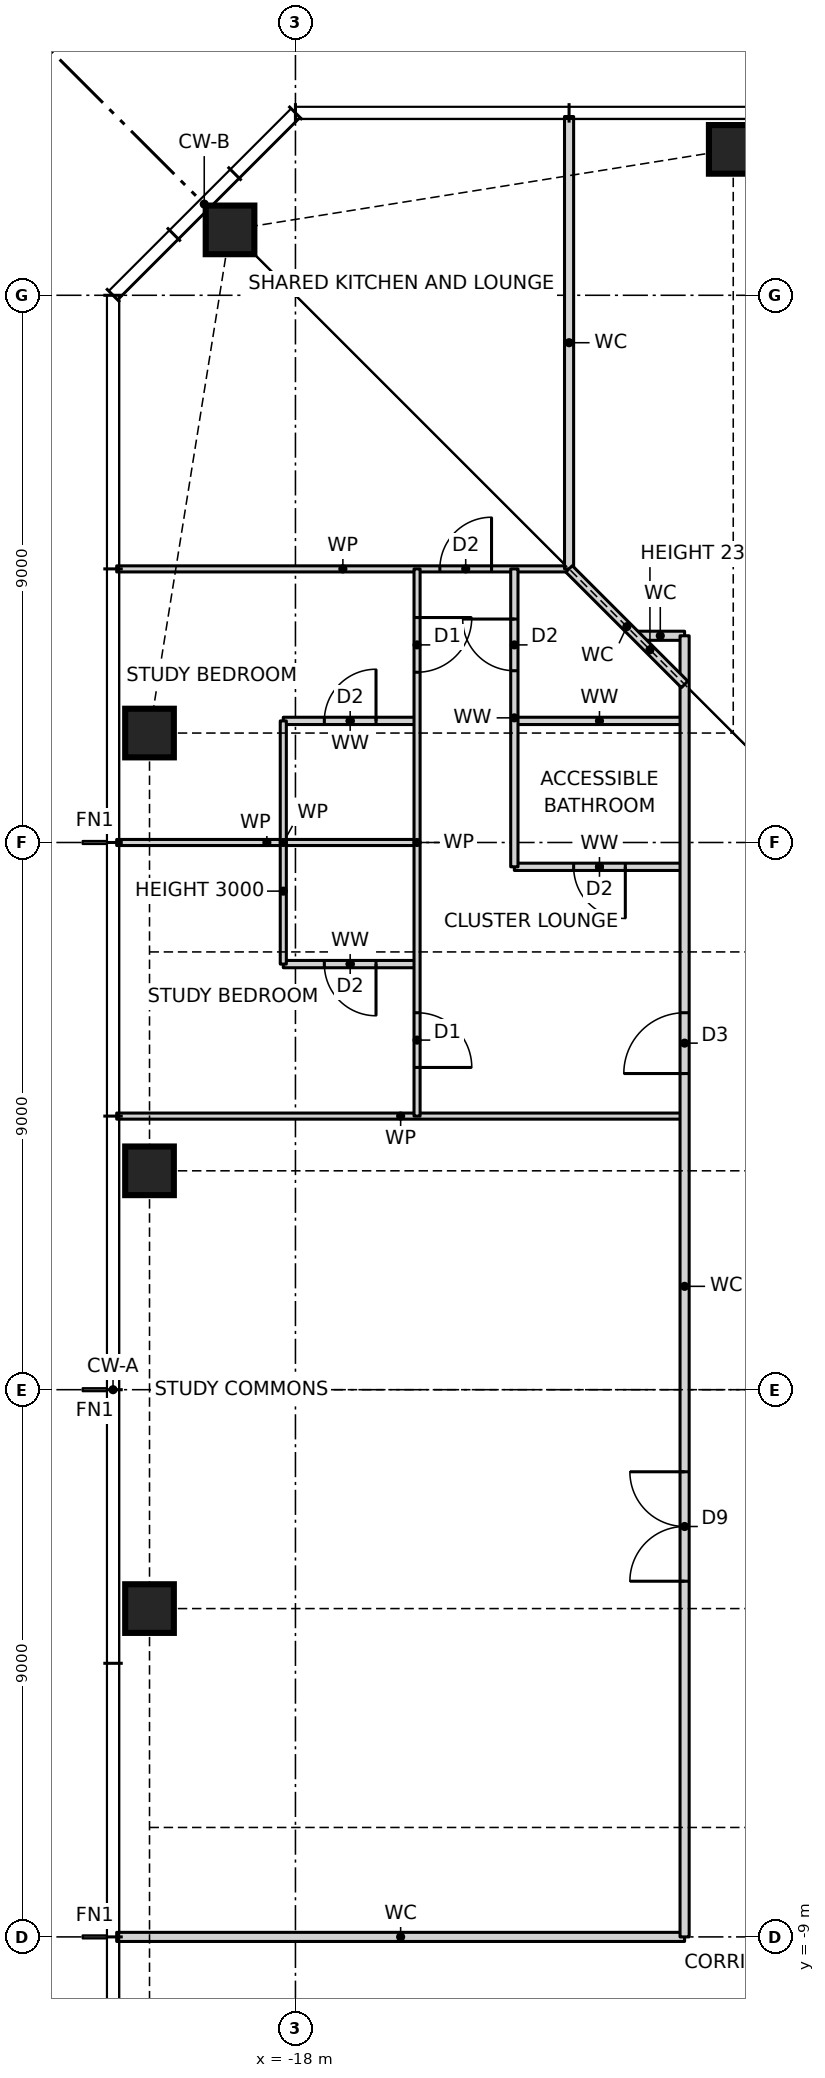
"""IFC4 building model, lengths in metres.
Left out: names, types, materials, properties, quantities, classifications, styles, units other than length and angle.
Written with IfcOpenShell. Run it as: python <this file> out.ifc"""

import sys

from ifc_helpers import new_model, si_unit, direction, frame, frame_2d, origin, origin_2d, place, context, subcontext, project, spatial, rectangle, hollow_rectangle, extrude, element, fill, save


model = new_model("IFC4")
c1 = context("Model", 3, precision=1e-05, world=origin(), true_north=direction((0.0, 1.0)))
c2 = subcontext(c1, "Body", "Model", "MODEL_VIEW")
j1 = project(units=[si_unit("LENGTHUNIT", "METRE"), si_unit("PLANEANGLEUNIT", "RADIAN")], contexts=[c1])
p1 = place(None, origin())
s1 = spatial("IfcSite", under=j1, at=p1, CompositionType="ELEMENT")
p2 = place(p1, origin())
s2 = spatial("IfcBuilding", under=s1, at=p2, CompositionType="ELEMENT")
p3 = place(p2, frame((0.0, 0.0, 115.5)))
s3 = spatial("IfcBuildingStorey", under=s2, at=p3, CompositionType="ELEMENT", Elevation=115.5)
for number, where, z_axis, x_axis in (
    (1, (-10.8, 20.4, 0.0), (0.0, 0.0, 1.0), (1.0, 0.0, 0.0)),
    (2, (-19.076, 19.076, 0.0), (0.0, 0.0, 1.0), (1.0, 0.0, 0.0)),
    (3, (-20.4, 10.8, 0.0), (0.0, 0.0, 1.0), (1.0, 0.0, 0.0)),
    (4, (-20.4, 3.6, 0.0), (0.0, 0.0, 1.0), (1.0, 0.0, 0.0)),
    (5, (-20.4, -3.6, 0.0), (0.0, 0.0, 1.0), (1.0, 0.0, 0.0)),
):
    element("IfcColumn", number, at=place(p3, frame(where, z_axis=z_axis, x_axis=x_axis)), inside=s3, PredefinedType="COLUMN", context=c2, shape_type="SweptSolid", body=[
        extrude(hollow_rectangle(XDim=0.8, YDim=0.8, WallThickness=0.07, at=origin_2d()), origin(), (0.0, 0.0, 1.0), 3.5),
    ])
p4 = place(p3, frame((-20.94, -9.0, 0.0), z_axis=(0.0, 0.0, 1.0), x_axis=(1.0, 0.0, 0.0)))
e6 = element("IfcWall", 6, at=p4, inside=s3, PredefinedType="PARTITIONING", context=c2, shape_type="SweptSolid", body=[
    extrude(rectangle(XDim=9.34, YDim=0.15, at=frame_2d((4.67, 0.0))), origin(), (0.0, 0.0, 1.0), 3.27),
])
p5 = place(p3, frame((-20.94, 4.5, 0.0), z_axis=(0.0, 0.0, 1.0), x_axis=(1.0, 0.0, 0.0)))
e7 = element("IfcWall", 7, at=p5, inside=s3, PredefinedType="PARTITIONING", context=c2, shape_type="SweptSolid", body=[
    extrude(rectangle(XDim=9.34, YDim=0.1, at=frame_2d((4.67, 0.0))), origin(), (0.0, 0.0, 1.0), 3.27),
])
p6 = place(p3, frame((-18.2, 7.0, 0.0), z_axis=(0.0, 0.0, 1.0), x_axis=(1.0, 0.0, 0.0)))
e8 = element("IfcWall", 8, at=p6, inside=s3, PredefinedType="PARTITIONING", context=c2, shape_type="SweptSolid", body=[
    extrude(rectangle(XDim=2.2, YDim=0.12, at=frame_2d((1.1, 0.0))), origin(), (0.0, 0.0, 1.0), 3.27),
])
p7 = place(p6, frame((0.675, 0.0, 0.0)))
e9 = element("IfcOpeningElement", 9, at=p7, cuts=e8, PredefinedType="OPENING", context=c2, shape_type="SweptSolid", body=[
    extrude(rectangle(XDim=0.85, YDim=2.1, at=frame_2d((0.425, 1.05))), frame((0.0, 0.07, 0.0), z_axis=(0.0, -1.0, 0.0), x_axis=(1.0, 0.0, 0.0)), (0.0, 0.0, 1.0), 0.14),
])
p8 = place(p3, frame((-14.4, 8.6, 0.0), z_axis=(0.0, 0.0, 1.0), x_axis=(1.0, 0.0, 0.0)))
e10 = element("IfcWall", 10, at=p8, inside=s3, PredefinedType="PARTITIONING", context=c2, shape_type="SweptSolid", body=[
    extrude(rectangle(XDim=2.8, YDim=0.12, at=frame_2d((1.4, 0.0))), origin(), (0.0, 0.0, 1.0), 3.27),
])
p9 = place(p8, frame((0.975, 0.0, 0.0)))
e11 = element("IfcOpeningElement", 11, at=p9, cuts=e10, PredefinedType="OPENING", context=c2, shape_type="SweptSolid", body=[
    extrude(rectangle(XDim=0.85, YDim=2.1, at=frame_2d((0.425, 1.05))), frame((0.0, 0.07, 0.0), z_axis=(0.0, -1.0, 0.0), x_axis=(1.0, 0.0, 0.0)), (0.0, 0.0, 1.0), 0.14),
])
p10 = place(p3, frame((-20.94, 9.0, 0.0), z_axis=(0.0, 0.0, 1.0), x_axis=(1.0, 0.0, 0.0)))
e12 = element("IfcWall", 12, at=p10, inside=s3, PredefinedType="PARTITIONING", context=c2, shape_type="SweptSolid", body=[
    extrude(rectangle(XDim=4.94, YDim=0.1, at=frame_2d((2.47, 0.0))), origin(), (0.0, 0.0, 1.0), 3.27),
])
p11 = place(p3, frame((-18.2, 11.0, 0.0), z_axis=(0.0, 0.0, 1.0), x_axis=(1.0, 0.0, 0.0)))
e13 = element("IfcWall", 13, at=p11, inside=s3, PredefinedType="PARTITIONING", context=c2, shape_type="SweptSolid", body=[
    extrude(rectangle(XDim=2.2, YDim=0.12, at=frame_2d((1.1, 0.0))), origin(), (0.0, 0.0, 1.0), 3.27),
])
p12 = place(p11, frame((0.675, 0.0, 0.0)))
e14 = element("IfcOpeningElement", 14, at=p12, cuts=e13, PredefinedType="OPENING", context=c2, shape_type="SweptSolid", body=[
    extrude(rectangle(XDim=0.85, YDim=2.1, at=frame_2d((0.425, 1.05))), frame((0.0, 0.07, 0.0), z_axis=(0.0, -1.0, 0.0), x_axis=(1.0, 0.0, 0.0)), (0.0, 0.0, 1.0), 0.14),
])
p13 = place(p3, frame((-14.4, 11.0, 0.0), z_axis=(0.0, 0.0, 1.0), x_axis=(1.0, 0.0, 0.0)))
e15 = element("IfcWall", 15, at=p13, inside=s3, PredefinedType="PARTITIONING", context=c2, shape_type="SweptSolid", body=[
    extrude(rectangle(XDim=2.8, YDim=0.12, at=frame_2d((1.4, 0.0))), origin(), (0.0, 0.0, 1.0), 3.27),
])
p14 = place(p3, frame((-12.4, 12.4, 0.0), z_axis=(0.0, 0.0, 1.0), x_axis=(1.0, 0.0, 0.0)))
e16 = element("IfcWall", 16, at=p14, inside=s3, PredefinedType="PARTITIONING", context=c2, shape_type="SweptSolid", body=[
    extrude(rectangle(XDim=0.8, YDim=0.15, at=frame_2d((0.4, 0.0))), origin(), (0.0, 0.0, 1.0), 3.27),
])
p15 = place(p3, frame((-20.94, 13.5, 0.0), z_axis=(0.0, 0.0, 1.0), x_axis=(1.0, 0.0, 0.0)))
e17 = element("IfcWall", 17, at=p15, inside=s3, PredefinedType="PARTITIONING", context=c2, shape_type="SweptSolid", body=[
    extrude(rectangle(XDim=7.44, YDim=0.1, at=frame_2d((3.72, 0.0))), origin(), (0.0, 0.0, 1.0), 3.27),
])
p16 = place(p15, frame((5.315, 0.0, 0.0)))
e18 = element("IfcOpeningElement", 18, at=p16, cuts=e17, PredefinedType="OPENING", context=c2, shape_type="SweptSolid", body=[
    extrude(rectangle(XDim=0.85, YDim=2.1, at=frame_2d((0.425, 1.05))), frame((0.0, 0.06, 0.0), z_axis=(0.0, -1.0, 0.0), x_axis=(1.0, 0.0, 0.0)), (0.0, 0.0, 1.0), 0.12),
])
p17 = place(p3, frame((-11.6, -9.0, 0.0), z_axis=(0.0, 0.0, 1.0), x_axis=(0.0, 1.0, 0.0)))
e19 = element("IfcWall", 19, at=p17, inside=s3, PredefinedType="PARTITIONING", context=c2, shape_type="SweptSolid", body=[
    extrude(rectangle(XDim=21.4, YDim=0.15, at=frame_2d((10.7, 0.0))), origin(), (0.0, 0.0, 1.0), 3.27),
])
p18 = place(p17, frame((14.2, 0.0, 0.0)))
e20 = element("IfcOpeningElement", 20, at=p18, cuts=e19, PredefinedType="OPENING", context=c2, shape_type="SweptSolid", body=[
    extrude(rectangle(XDim=1.0, YDim=2.1, at=frame_2d((0.5, 1.05))), frame((0.0, 0.085, 0.0), z_axis=(0.0, -1.0, 0.0), x_axis=(1.0, 0.0, 0.0)), (0.0, 0.0, 1.0), 0.17),
])
p19 = place(p17, frame((5.85, 0.0, 0.0)))
e21 = element("IfcOpeningElement", 21, at=p19, cuts=e19, PredefinedType="OPENING", context=c2, shape_type="SweptSolid", body=[
    extrude(rectangle(XDim=1.8, YDim=2.1, at=frame_2d((0.9, 1.05))), frame((0.0, 0.085, 0.0), z_axis=(0.0, -1.0, 0.0), x_axis=(1.0, 0.0, 0.0)), (0.0, 0.0, 1.0), 0.17),
])
p20 = place(p3, frame((-13.5, 13.5, 0.0), z_axis=(0.0, 0.0, 1.0), x_axis=(0.0, 1.0, 0.0)))
e22 = element("IfcWall", 22, at=p20, inside=s3, PredefinedType="PARTITIONING", context=c2, shape_type="SweptSolid", body=[
    extrude(rectangle(XDim=7.44, YDim=0.15, at=frame_2d((3.72, 0.0))), origin(), (0.0, 0.0, 1.0), 3.27),
])
p21 = place(p3, frame((-14.4, 8.6, 0.0), z_axis=(0.0, 0.0, 1.0), x_axis=(0.0, 1.0, 0.0)))
e23 = element("IfcWall", 23, at=p21, inside=s3, PredefinedType="PARTITIONING", context=c2, shape_type="SweptSolid", body=[
    extrude(rectangle(XDim=4.9, YDim=0.12, at=frame_2d((2.45, 0.0))), origin(), (0.0, 0.0, 1.0), 3.27),
])
p22 = place(p21, frame((3.225, 0.0, 0.0)))
e24 = element("IfcOpeningElement", 24, at=p22, cuts=e23, PredefinedType="OPENING", context=c2, shape_type="SweptSolid", body=[
    extrude(rectangle(XDim=0.85, YDim=2.1, at=frame_2d((0.425, 1.05))), frame((0.0, 0.07, 0.0), z_axis=(0.0, -1.0, 0.0), x_axis=(1.0, 0.0, 0.0)), (0.0, 0.0, 1.0), 0.14),
])
p23 = place(p3, frame((-16.0, 4.5, 0.0), z_axis=(0.0, 0.0, 1.0), x_axis=(0.0, 1.0, 0.0)))
e25 = element("IfcWall", 25, at=p23, inside=s3, PredefinedType="PARTITIONING", context=c2, shape_type="SweptSolid", body=[
    extrude(rectangle(XDim=9.0, YDim=0.1, at=frame_2d((4.5, 0.0))), origin(), (0.0, 0.0, 1.0), 3.27),
])
p24 = place(p23, frame((7.3, 0.0, 0.0)))
e26 = element("IfcOpeningElement", 26, at=p24, cuts=e25, PredefinedType="OPENING", context=c2, shape_type="SweptSolid", body=[
    extrude(rectangle(XDim=0.9, YDim=2.1, at=frame_2d((0.45, 1.05))), frame((0.0, 0.06, 0.0), z_axis=(0.0, -1.0, 0.0), x_axis=(1.0, 0.0, 0.0)), (0.0, 0.0, 1.0), 0.12),
])
p25 = place(p23, frame((0.8, 0.0, 0.0)))
e27 = element("IfcOpeningElement", 27, at=p25, cuts=e25, PredefinedType="OPENING", context=c2, shape_type="SweptSolid", body=[
    extrude(rectangle(XDim=0.9, YDim=2.1, at=frame_2d((0.45, 1.05))), frame((0.0, 0.06, 0.0), z_axis=(0.0, -1.0, 0.0), x_axis=(1.0, 0.0, 0.0)), (0.0, 0.0, 1.0), 0.12),
])
p26 = place(p3, frame((-18.2, 7.0, 0.0), z_axis=(0.0, 0.0, 1.0), x_axis=(0.0, 1.0, 0.0)))
e28 = element("IfcWall", 28, at=p26, inside=s3, PredefinedType="PARTITIONING", context=c2, shape_type="SweptSolid", body=[
    extrude(rectangle(XDim=4.0, YDim=0.1, at=frame_2d((2.0, 0.0))), origin(), (0.0, 0.0, 1.0), 3.0),
])
p27 = place(p3, frame((-11.6, 11.6, 0.0), z_axis=(0.0, 0.0, 1.0), x_axis=(-0.707106781187, 0.707106781187, 0.0)))
e29 = element("IfcWall", 29, at=p27, inside=s3, PredefinedType="PARTITIONING", context=c2, shape_type="SweptSolid", body=[
    extrude(rectangle(XDim=2.687, YDim=0.15, at=frame_2d((1.343, 0.0))), origin(), (0.0, 0.0, 1.0), 2.343),
])
p28 = place(p12, origin())
e30 = element("IfcDoor", 30, at=p28, inside=s3, OperationType="SINGLE_SWING_RIGHT", PredefinedType="DOOR", context=c2, shape_type="SweptSolid", body=[
    extrude(rectangle(XDim=0.85, YDim=2.1, at=frame_2d((0.425, 1.05))), frame((0.0, 0.025, 0.0), z_axis=(0.0, -1.0, 0.0), x_axis=(1.0, 0.0, 0.0)), (0.0, 0.0, 1.0), 0.05),
])
fill(e14, e30)
p29 = place(p24, frame((0.9, 0.0, 0.0), z_axis=(0.0, 0.0, 1.0), x_axis=(-1.0, 0.0, 0.0)))
e31 = element("IfcDoor", 31, at=p29, inside=s3, OperationType="SINGLE_SWING_LEFT", PredefinedType="DOOR", context=c2, shape_type="SweptSolid", body=[
    extrude(rectangle(XDim=0.9, YDim=2.1, at=frame_2d((0.45, 1.05))), frame((0.0, 0.025, 0.0), z_axis=(0.0, -1.0, 0.0), x_axis=(1.0, 0.0, 0.0)), (0.0, 0.0, 1.0), 0.05),
])
fill(e26, e31)
p30 = place(p7, frame((0.85, 0.0, 0.0), z_axis=(0.0, 0.0, 1.0), x_axis=(-1.0, 0.0, 0.0)))
e32 = element("IfcDoor", 32, at=p30, inside=s3, OperationType="SINGLE_SWING_LEFT", PredefinedType="DOOR", context=c2, shape_type="SweptSolid", body=[
    extrude(rectangle(XDim=0.85, YDim=2.1, at=frame_2d((0.425, 1.05))), frame((0.0, 0.025, 0.0), z_axis=(0.0, -1.0, 0.0), x_axis=(1.0, 0.0, 0.0)), (0.0, 0.0, 1.0), 0.05),
])
fill(e9, e32)
p31 = place(p25, frame((0.9, 0.0, 0.0), z_axis=(0.0, 0.0, 1.0), x_axis=(-1.0, 0.0, 0.0)))
e33 = element("IfcDoor", 33, at=p31, inside=s3, OperationType="SINGLE_SWING_RIGHT", PredefinedType="DOOR", context=c2, shape_type="SweptSolid", body=[
    extrude(rectangle(XDim=0.9, YDim=2.1, at=frame_2d((0.45, 1.05))), frame((0.0, 0.025, 0.0), z_axis=(0.0, -1.0, 0.0), x_axis=(1.0, 0.0, 0.0)), (0.0, 0.0, 1.0), 0.05),
])
fill(e27, e33)
p32 = place(p18, origin())
e34 = element("IfcDoor", 34, at=p32, inside=s3, OperationType="SINGLE_SWING_LEFT", PredefinedType="DOOR", context=c2, shape_type="SweptSolid", body=[
    extrude(rectangle(XDim=1.0, YDim=2.1, at=frame_2d((0.5, 1.05))), frame((0.0, 0.025, 0.0), z_axis=(0.0, -1.0, 0.0), x_axis=(1.0, 0.0, 0.0)), (0.0, 0.0, 1.0), 0.05),
])
fill(e20, e34)
p33 = place(p22, origin())
e35 = element("IfcDoor", 35, at=p33, inside=s3, OperationType="SINGLE_SWING_RIGHT", PredefinedType="DOOR", context=c2, shape_type="SweptSolid", body=[
    extrude(rectangle(XDim=0.85, YDim=2.1, at=frame_2d((0.425, 1.05))), frame((0.0, 0.025, 0.0), z_axis=(0.0, -1.0, 0.0), x_axis=(1.0, 0.0, 0.0)), (0.0, 0.0, 1.0), 0.05),
])
fill(e24, e35)
p34 = place(p9, frame((0.85, 0.0, 0.0), z_axis=(0.0, 0.0, 1.0), x_axis=(-1.0, 0.0, 0.0)))
e36 = element("IfcDoor", 36, at=p34, inside=s3, OperationType="SINGLE_SWING_LEFT", PredefinedType="DOOR", context=c2, shape_type="SweptSolid", body=[
    extrude(rectangle(XDim=0.85, YDim=2.1, at=frame_2d((0.425, 1.05))), frame((0.0, 0.025, 0.0), z_axis=(0.0, -1.0, 0.0), x_axis=(1.0, 0.0, 0.0)), (0.0, 0.0, 1.0), 0.05),
])
fill(e11, e36)
p35 = place(p19, origin())
e37 = element("IfcDoor", 37, at=p35, inside=s3, OperationType="DOUBLE_DOOR_SINGLE_SWING", PredefinedType="DOOR", context=c2, shape_type="SweptSolid", body=[
    extrude(rectangle(XDim=1.8, YDim=2.1, at=frame_2d((0.9, 1.05))), frame((0.0, 0.025, 0.0), z_axis=(0.0, -1.0, 0.0), x_axis=(1.0, 0.0, 0.0)), (0.0, 0.0, 1.0), 0.05),
])
fill(e21, e37)
p36 = place(p16, origin())
e38 = element("IfcDoor", 38, at=p36, inside=s3, OperationType="SINGLE_SWING_RIGHT", PredefinedType="DOOR", context=c2, shape_type="SweptSolid", body=[
    extrude(rectangle(XDim=0.85, YDim=2.1, at=frame_2d((0.425, 1.05))), frame((0.0, 0.025, 0.0), z_axis=(0.0, -1.0, 0.0), x_axis=(1.0, 0.0, 0.0)), (0.0, 0.0, 1.0), 0.05),
])
fill(e18, e38)
save(model, sys.argv[1])
